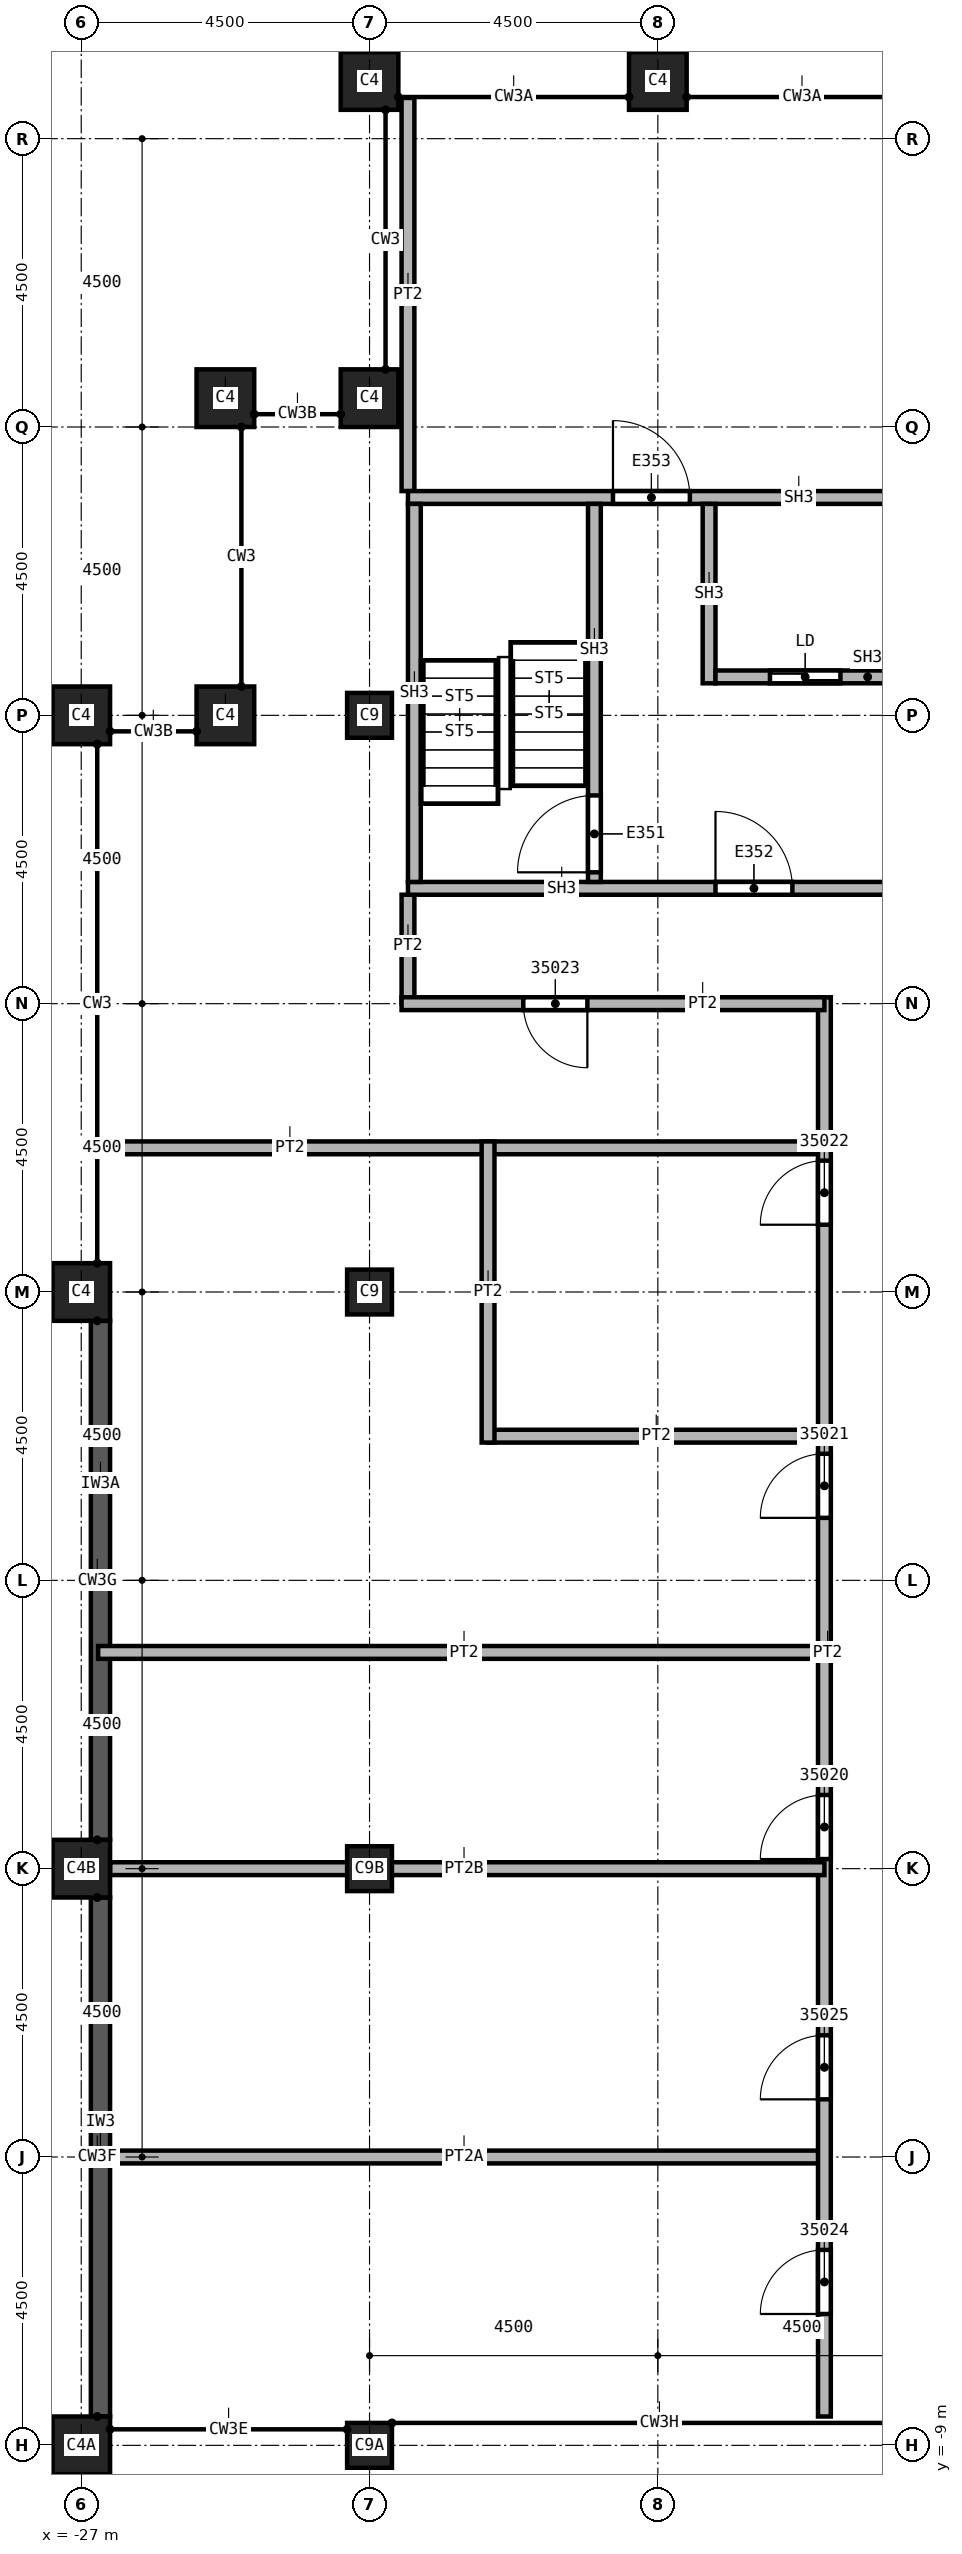
"""IFC4 building model, lengths in metres.
Left out: names, types, materials, properties, quantities, classifications, styles, units other than length and angle.
Written with IfcOpenShell. Run it as: python <this file> out.ifc"""

import sys

from ifc_helpers import new_model, si_unit, direction, frame, frame_2d, origin, origin_2d, place, context, subcontext, project, spatial, polyline, rectangle, outline, extrude, element, fill, save


model = new_model("IFC4")
c1 = context("Model", 3, precision=1e-05, world=origin(), true_north=direction((0.0, 1.0)))
c2 = subcontext(c1, "Body", "Model", "MODEL_VIEW")
j1 = project(units=[si_unit("LENGTHUNIT", "METRE"), si_unit("PLANEANGLEUNIT", "RADIAN")], contexts=[c1])
p1 = place(None, origin())
s1 = spatial("IfcSite", under=j1, at=p1, CompositionType="ELEMENT")
p2 = place(p1, origin())
s2 = spatial("IfcBuilding", under=s1, at=p2, CompositionType="ELEMENT")
p3 = place(p2, frame((0.0, 0.0, 376.0)))
s3 = spatial("IfcBuildingStorey", under=s2, at=p3, CompositionType="ELEMENT", Elevation=376.0)
p4 = place(p3, frame((-22.5, 0.0, 0.0), z_axis=(0.0, 0.0, 1.0), x_axis=(1.0, 0.0, 0.0)))
e1 = element("IfcColumn", 1, at=p4, inside=s3, PredefinedType="COLUMN", context=c2, shape_type="SweptSolid", body=[
    extrude(rectangle(XDim=0.7, YDim=0.7, at=origin_2d()), origin(), (0.0, 0.0, 1.0), 7.919),
])
for number, where, z_axis, x_axis in (
    (2, (-22.5, 9.0, 0.0), (0.0, 0.0, 1.0), (1.0, 0.0, 0.0)),
    (3, (-22.5, 18.0, 0.0), (0.0, 0.0, 1.0), (1.0, 0.0, 0.0)),
):
    element("IfcColumn", number, at=place(p3, frame(where, z_axis=z_axis, x_axis=x_axis)), inside=s3, PredefinedType="COLUMN", context=c2, shape_type="SweptSolid", body=[
        extrude(rectangle(XDim=0.7, YDim=0.7, at=origin_2d()), origin(), (0.0, 0.0, 1.0), 4.6),
    ])
p5 = place(p3, frame((-22.5, -9.0, 0.0), z_axis=(0.0, 0.0, 1.0), x_axis=(1.0, 0.0, 0.0)))
e4 = element("IfcColumn", 4, at=p5, inside=s3, PredefinedType="COLUMN", context=c2, shape_type="SweptSolid", body=[
    extrude(rectangle(XDim=0.7, YDim=0.7, at=origin_2d()), origin(), (0.0, 0.0, 1.0), 3.725),
])
for number, where, z_axis, x_axis in (
    (5, (-18.0, 27.9, 0.0), (0.0, 0.0, 1.0), (1.0, 0.0, 0.0)),
    (6, (-22.5, 27.9, 0.0), (0.0, 0.0, 1.0), (1.0, 0.0, 0.0)),
):
    element("IfcColumn", number, at=place(p3, frame(where, z_axis=z_axis, x_axis=x_axis)), inside=s3, PredefinedType="COLUMN", context=c2, shape_type="SweptSolid", body=[
        extrude(rectangle(XDim=0.9, YDim=0.9, at=origin_2d()), origin(), (0.0, 0.0, 1.0), 4.6),
    ])
p6 = place(p3, frame((-27.0, 0.0, 0.0), z_axis=(0.0, 0.0, 1.0), x_axis=(0.0, 1.0, 0.0)))
e7 = element("IfcColumn", 7, at=p6, inside=s3, PredefinedType="COLUMN", context=c2, shape_type="SweptSolid", body=[
    extrude(rectangle(XDim=0.9, YDim=0.9, at=origin_2d()), origin(), (0.0, 0.0, 1.0), 7.919),
])
for number, where, z_axis, x_axis in (
    (8, (-27.0, 9.0, 0.0), (0.0, 0.0, 1.0), (0.0, 1.0, 0.0)),
    (9, (-27.0, 18.0, 0.0), (0.0, 0.0, 1.0), (0.0, 1.0, 0.0)),
):
    element("IfcColumn", number, at=place(p3, frame(where, z_axis=z_axis, x_axis=x_axis)), inside=s3, PredefinedType="COLUMN", context=c2, shape_type="SweptSolid", body=[
        extrude(rectangle(XDim=0.9, YDim=0.9, at=origin_2d()), origin(), (0.0, 0.0, 1.0), 4.6),
    ])
p7 = place(p3, frame((-27.0, -9.0, 0.0), z_axis=(0.0, 0.0, 1.0), x_axis=(0.0, 1.0, 0.0)))
e10 = element("IfcColumn", 10, at=p7, inside=s3, PredefinedType="COLUMN", context=c2, shape_type="SweptSolid", body=[
    extrude(rectangle(XDim=0.9, YDim=0.9, at=origin_2d()), origin(), (0.0, 0.0, 1.0), 3.725),
])
for number, where, z_axis, x_axis in (
    (11, (-22.5, 22.95, 0.0), (0.0, 0.0, 1.0), (1.0, 0.0, 0.0)),
    (12, (-24.75, 22.95, 0.0), (0.0, 0.0, 1.0), (1.0, 0.0, 0.0)),
    (13, (-24.75, 18.0, 0.0), (0.0, 0.0, 1.0), (1.0, 0.0, 0.0)),
):
    element("IfcColumn", number, at=place(p3, frame(where, z_axis=z_axis, x_axis=x_axis)), inside=s3, PredefinedType="COLUMN", context=c2, shape_type="SweptSolid", body=[
        extrude(rectangle(XDim=0.9, YDim=0.9, at=origin_2d()), origin(), (0.0, 0.0, 1.0), 4.6),
    ])
p8 = place(p3, frame((-26.7, 8.55, 8.633), z_axis=(0.0, 0.0, 1.0), x_axis=(0.0, -1.0, 0.0)))
e14 = element("IfcWall", 14, at=p8, inside=s3, PredefinedType="SOLIDWALL", context=c2, shape_type="SweptSolid", body=[
    extrude(outline(polyline([(0.0, 0.0), (8.1, 0.0), (8.1, 0.05), (0.0, 3.728), (0.0, 0.0)])), frame((0.0, 0.15, 0.0), z_axis=(0.0, -1.0, 0.0), x_axis=(1.0, 0.0, 0.0)), (0.0, 0.0, 1.0), 0.3),
])
p9 = place(p3, frame((-26.7, -0.45, 4.439), z_axis=(0.0, 0.0, 1.0), x_axis=(0.0, -1.0, 0.0)))
e15 = element("IfcWall", 15, at=p9, inside=s3, PredefinedType="SOLIDWALL", context=c2, shape_type="SweptSolid", body=[
    extrude(outline(polyline([(0.0, 0.0), (8.1, 0.0), (8.1, 0.05), (0.0, 3.728), (0.0, 0.0)])), frame((0.0, 0.15, 0.0), z_axis=(0.0, -1.0, 0.0), x_axis=(1.0, 0.0, 0.0)), (0.0, 0.0, 1.0), 0.3),
])
for number, where, z_axis, x_axis in (
    (16, (-26.736, 3.375, 0.0), (0.0, 0.0, 1.0), (1.0, 0.0, 0.0)),
    (17, (-26.736, 11.25, 0.0), (0.0, 0.0, 1.0), (1.0, 0.0, 0.0)),
):
    element("IfcWall", number, at=place(p3, frame(where, z_axis=z_axis, x_axis=x_axis)), inside=s3, PredefinedType="PARTITIONING", context=c2, shape_type="SweptSolid", body=[
        extrude(rectangle(XDim=11.336, YDim=0.2, at=frame_2d((5.668, 0.0))), origin(), (0.0, 0.0, 1.0), 4.15),
    ])
p10 = place(p3, frame((-26.55, -4.5, 0.0), z_axis=(0.0, 0.0, 1.0), x_axis=(1.0, 0.0, 0.0)))
e18 = element("IfcWall", 18, at=p10, inside=s3, PredefinedType="PARTITIONING", context=c2, shape_type="SweptSolid", body=[
    extrude(rectangle(XDim=11.15, YDim=0.2, at=frame_2d((5.575, 0.0))), origin(), (0.0, 0.0, 1.0), 4.566),
])
p11 = place(p3, frame((-21.9, 13.5, 0.0), z_axis=(0.0, 0.0, 1.0), x_axis=(0.0, 1.0, 0.0)))
e19 = element("IfcWall", 19, at=p11, inside=s3, PredefinedType="PARTITIONING", context=c2, shape_type="SweptSolid", body=[
    extrude(rectangle(XDim=1.7, YDim=0.2, at=frame_2d((0.85, 0.0))), origin(), (0.0, 0.0, 1.0), 4.15),
])
p12 = place(p3, frame((-21.9, 21.5, 0.0), z_axis=(0.0, 0.0, 1.0), x_axis=(0.0, 1.0, 0.0)))
e20 = element("IfcWall", 20, at=p12, inside=s3, PredefinedType="PARTITIONING", context=c2, shape_type="SweptSolid", body=[
    extrude(rectangle(XDim=6.136, YDim=0.2, at=frame_2d((3.068, 0.0))), origin(), (0.0, 0.0, 1.0), 4.15),
])
p13 = place(p3, frame((-20.65, 6.75, 0.0), z_axis=(0.0, 0.0, 1.0), x_axis=(1.0, 0.0, 0.0)))
e21 = element("IfcWall", 21, at=p13, inside=s3, PredefinedType="PARTITIONING", context=c2, shape_type="SweptSolid", body=[
    extrude(rectangle(XDim=5.25, YDim=0.2, at=frame_2d((2.625, 0.0))), origin(), (0.0, 0.0, 1.0), 4.15),
])
p14 = place(p3, frame((-20.65, 11.35, 0.0), z_axis=(0.0, 0.0, 1.0), x_axis=(0.0, -1.0, 0.0)))
e22 = element("IfcWall", 22, at=p14, inside=s3, PredefinedType="PARTITIONING", context=c2, shape_type="SweptSolid", body=[
    extrude(rectangle(XDim=4.7, YDim=0.2, at=frame_2d((2.35, 0.0))), origin(), (0.0, 0.0, 1.0), 4.15),
])
p15 = place(p3, frame((-15.4, -8.55, 0.0), z_axis=(0.0, 0.0, 1.0), x_axis=(0.0, 1.0, 0.0)))
e23 = element("IfcWall", 23, at=p15, inside=s3, PredefinedType="PARTITIONING", context=c2, shape_type="SweptSolid", body=[
    extrude(rectangle(XDim=22.15, YDim=0.2, at=frame_2d((11.075, 0.0))), origin(), (0.0, 0.0, 1.0), 4.15),
])
p16 = place(p15, frame((8.7, 0.0, 0.0)))
e24 = element("IfcOpeningElement", 24, at=p16, cuts=e23, PredefinedType="OPENING", context=c2, shape_type="SweptSolid", body=[
    extrude(rectangle(XDim=1.0, YDim=2.1, at=frame_2d((0.5, 1.05))), frame((0.0, 0.1, 0.0), z_axis=(0.0, -1.0, 0.0), x_axis=(1.0, 0.0, 0.0)), (0.0, 0.0, 1.0), 0.2),
])
p17 = place(p15, frame((14.025, 0.0, 0.0)))
e25 = element("IfcOpeningElement", 25, at=p17, cuts=e23, PredefinedType="OPENING", context=c2, shape_type="SweptSolid", body=[
    extrude(rectangle(XDim=1.0, YDim=2.1, at=frame_2d((0.5, 1.05))), frame((0.0, 0.1, 0.0), z_axis=(0.0, -1.0, 0.0), x_axis=(1.0, 0.0, 0.0)), (0.0, 0.0, 1.0), 0.2),
])
p18 = place(p15, frame((18.6, 0.0, 0.0)))
e26 = element("IfcOpeningElement", 26, at=p18, cuts=e23, PredefinedType="OPENING", context=c2, shape_type="SweptSolid", body=[
    extrude(rectangle(XDim=1.0, YDim=2.1, at=frame_2d((0.5, 1.05))), frame((0.0, 0.1, 0.0), z_axis=(0.0, -1.0, 0.0), x_axis=(1.0, 0.0, 0.0)), (0.0, 0.0, 1.0), 0.2),
])
p19 = place(p15, frame((1.6, 0.0, 0.0)))
e27 = element("IfcOpeningElement", 27, at=p19, cuts=e23, PredefinedType="OPENING", context=c2, shape_type="SweptSolid", body=[
    extrude(rectangle(XDim=1.0, YDim=2.1, at=frame_2d((0.5, 1.05))), frame((0.0, 0.1, 0.0), z_axis=(0.0, -1.0, 0.0), x_axis=(1.0, 0.0, 0.0)), (0.0, 0.0, 1.0), 0.2),
])
p20 = place(p15, frame((4.95, 0.0, 0.0)))
e28 = element("IfcOpeningElement", 28, at=p20, cuts=e23, PredefinedType="OPENING", context=c2, shape_type="SweptSolid", body=[
    extrude(rectangle(XDim=1.0, YDim=2.1, at=frame_2d((0.5, 1.05))), frame((0.0, 0.1, 0.0), z_axis=(0.0, -1.0, 0.0), x_axis=(1.0, 0.0, 0.0)), (0.0, 0.0, 1.0), 0.2),
])
p21 = place(p3, frame((-15.4, 0.0, 0.0), z_axis=(0.0, 0.0, 1.0), x_axis=(-1.0, 0.0, 0.0)))
e29 = element("IfcWall", 29, at=p21, inside=s3, PredefinedType="PARTITIONING", context=c2, shape_type="SweptSolid", body=[
    extrude(rectangle(XDim=11.15, YDim=0.2, at=frame_2d((5.575, 0.0))), origin(), (0.0, 0.0, 1.0), 6.453),
])
p22 = place(p3, frame((-15.4, 13.5, 0.0), z_axis=(0.0, 0.0, 1.0), x_axis=(-1.0, 0.0, 0.0)))
e30 = element("IfcWall", 30, at=p22, inside=s3, PredefinedType="PARTITIONING", context=c2, shape_type="SweptSolid", body=[
    extrude(rectangle(XDim=6.6, YDim=0.2, at=frame_2d((3.3, 0.0))), origin(), (0.0, 0.0, 1.0), 4.15),
])
p23 = place(p22, frame((3.7, 0.0, 0.0)))
e31 = element("IfcOpeningElement", 31, at=p23, cuts=e30, PredefinedType="OPENING", context=c2, shape_type="SweptSolid", body=[
    extrude(rectangle(XDim=1.0, YDim=2.1, at=frame_2d((0.5, 1.05))), frame((0.0, 0.1, 0.0), z_axis=(0.0, -1.0, 0.0), x_axis=(1.0, 0.0, 0.0)), (0.0, 0.0, 1.0), 0.2),
])
p24 = place(p3, frame((-21.9, 15.3, 0.0), z_axis=(0.0, 0.0, 1.0), x_axis=(1.0, 0.0, 0.0)))
e32 = element("IfcWall", 32, at=p24, inside=s3, PredefinedType="SOLIDWALL", context=c2, shape_type="SweptSolid", body=[
    extrude(rectangle(XDim=8.275, YDim=0.2, at=frame_2d((4.137, 0.0))), origin(), (0.0, 0.0, 1.0), 4.15),
])
p25 = place(p24, frame((4.8, 0.0, 0.0)))
e33 = element("IfcOpeningElement", 33, at=p25, cuts=e32, PredefinedType="OPENING", context=c2, shape_type="SweptSolid", body=[
    extrude(rectangle(XDim=1.2, YDim=2.1, at=frame_2d((0.6, 1.05))), frame((0.0, 0.1, 0.0), z_axis=(0.0, -1.0, 0.0), x_axis=(1.0, 0.0, 0.0)), (0.0, 0.0, 1.0), 0.2),
])
p26 = place(p3, frame((-21.9, 21.4, 0.0), z_axis=(0.0, 0.0, 1.0), x_axis=(1.0, 0.0, 0.0)))
e34 = element("IfcWall", 34, at=p26, inside=s3, PredefinedType="SOLIDWALL", context=c2, shape_type="SweptSolid", body=[
    extrude(rectangle(XDim=7.8, YDim=0.2, at=frame_2d((3.9, 0.0))), origin(), (0.0, 0.0, 1.0), 4.15),
])
p27 = place(p26, frame((3.2, 0.0, 0.0)))
e35 = element("IfcOpeningElement", 35, at=p27, cuts=e34, PredefinedType="OPENING", context=c2, shape_type="SweptSolid", body=[
    extrude(rectangle(XDim=1.2, YDim=2.1, at=frame_2d((0.6, 1.05))), frame((0.0, 0.1, 0.0), z_axis=(0.0, -1.0, 0.0), x_axis=(1.0, 0.0, 0.0)), (0.0, 0.0, 1.0), 0.2),
])
p28 = place(p3, frame((-21.8, 15.4, 0.0), z_axis=(0.0, 0.0, 1.0), x_axis=(0.0, 1.0, 0.0)))
e36 = element("IfcWall", 36, at=p28, inside=s3, PredefinedType="SOLIDWALL", context=c2, shape_type="SweptSolid", body=[
    extrude(rectangle(XDim=5.9, YDim=0.2, at=frame_2d((2.95, 0.0))), origin(), (0.0, 0.0, 1.0), 4.15),
])
p29 = place(p3, frame((-18.99, 15.4, 0.0), z_axis=(0.0, 0.0, 1.0), x_axis=(0.0, 1.0, 0.0)))
e37 = element("IfcWall", 37, at=p29, inside=s3, PredefinedType="SOLIDWALL", context=c2, shape_type="SweptSolid", body=[
    extrude(rectangle(XDim=5.9, YDim=0.2, at=frame_2d((2.95, 0.0))), origin(), (0.0, 0.0, 1.0), 4.15),
])
p30 = place(p29, frame((0.15, 0.0, 0.0)))
e38 = element("IfcOpeningElement", 38, at=p30, cuts=e37, PredefinedType="OPENING", context=c2, shape_type="SweptSolid", body=[
    extrude(rectangle(XDim=1.2, YDim=2.1, at=frame_2d((0.6, 1.05))), frame((0.0, 0.1, 0.0), z_axis=(0.0, -1.0, 0.0), x_axis=(1.0, 0.0, 0.0)), (0.0, 0.0, 1.0), 0.2),
])
p31 = place(p3, frame((-17.2, 18.5, 0.0), z_axis=(0.0, 0.0, 1.0), x_axis=(0.0, 1.0, 0.0)))
e39 = element("IfcWall", 39, at=p31, inside=s3, PredefinedType="SOLIDWALL", context=c2, shape_type="SweptSolid", body=[
    extrude(rectangle(XDim=2.8, YDim=0.2, at=frame_2d((1.4, 0.0))), origin(), (0.0, 0.0, 1.0), 4.15),
])
p32 = place(p3, frame((-17.1, 18.6, 0.0), z_axis=(0.0, 0.0, 1.0), x_axis=(1.0, 0.0, 0.0)))
e40 = element("IfcWall", 40, at=p32, inside=s3, PredefinedType="SOLIDWALL", context=c2, shape_type="SweptSolid", body=[
    extrude(rectangle(XDim=2.8, YDim=0.2, at=frame_2d((1.4, 0.0))), origin(), (0.0, 0.0, 1.0), 4.15),
])
p33 = place(p32, frame((0.85, 0.0, 0.0)))
e41 = element("IfcOpeningElement", 41, at=p33, cuts=e40, PredefinedType="OPENING", context=c2, shape_type="SweptSolid", body=[
    extrude(rectangle(XDim=1.1, YDim=2.1, at=frame_2d((0.55, 1.05))), frame((0.0, 0.1, 0.0), z_axis=(0.0, -1.0, 0.0), x_axis=(1.0, 0.0, 0.0)), (0.0, 0.0, 1.0), 0.2),
])
p34 = place(p16, origin())
e42 = element("IfcDoor", 42, at=p34, inside=s3, OperationType="SINGLE_SWING_LEFT", PredefinedType="DOOR", context=c2, shape_type="SweptSolid", body=[
    extrude(rectangle(XDim=1.0, YDim=2.1, at=frame_2d((0.5, 1.05))), frame((0.0, 0.025, 0.0), z_axis=(0.0, -1.0, 0.0), x_axis=(1.0, 0.0, 0.0)), (0.0, 0.0, 1.0), 0.05),
])
fill(e24, e42)
p35 = place(p17, origin())
e43 = element("IfcDoor", 43, at=p35, inside=s3, OperationType="SINGLE_SWING_RIGHT", PredefinedType="DOOR", context=c2, shape_type="SweptSolid", body=[
    extrude(rectangle(XDim=1.0, YDim=2.1, at=frame_2d((0.5, 1.05))), frame((0.0, 0.025, 0.0), z_axis=(0.0, -1.0, 0.0), x_axis=(1.0, 0.0, 0.0)), (0.0, 0.0, 1.0), 0.05),
])
fill(e25, e43)
p36 = place(p18, origin())
e44 = element("IfcDoor", 44, at=p36, inside=s3, OperationType="SINGLE_SWING_LEFT", PredefinedType="DOOR", context=c2, shape_type="SweptSolid", body=[
    extrude(rectangle(XDim=1.0, YDim=2.1, at=frame_2d((0.5, 1.05))), frame((0.0, 0.025, 0.0), z_axis=(0.0, -1.0, 0.0), x_axis=(1.0, 0.0, 0.0)), (0.0, 0.0, 1.0), 0.05),
])
fill(e26, e44)
p37 = place(p23, origin())
e45 = element("IfcDoor", 45, at=p37, inside=s3, OperationType="SINGLE_SWING_RIGHT", PredefinedType="DOOR", context=c2, shape_type="SweptSolid", body=[
    extrude(rectangle(XDim=1.0, YDim=2.1, at=frame_2d((0.5, 1.05))), frame((0.0, 0.025, 0.0), z_axis=(0.0, -1.0, 0.0), x_axis=(1.0, 0.0, 0.0)), (0.0, 0.0, 1.0), 0.05),
])
fill(e31, e45)
p38 = place(p19, origin())
e46 = element("IfcDoor", 46, at=p38, inside=s3, OperationType="SINGLE_SWING_LEFT", PredefinedType="DOOR", context=c2, shape_type="SweptSolid", body=[
    extrude(rectangle(XDim=1.0, YDim=2.1, at=frame_2d((0.5, 1.05))), frame((0.0, 0.025, 0.0), z_axis=(0.0, -1.0, 0.0), x_axis=(1.0, 0.0, 0.0)), (0.0, 0.0, 1.0), 0.05),
])
fill(e27, e46)
p39 = place(p20, origin())
e47 = element("IfcDoor", 47, at=p39, inside=s3, OperationType="SINGLE_SWING_RIGHT", PredefinedType="DOOR", context=c2, shape_type="SweptSolid", body=[
    extrude(rectangle(XDim=1.0, YDim=2.1, at=frame_2d((0.5, 1.05))), frame((0.0, 0.025, 0.0), z_axis=(0.0, -1.0, 0.0), x_axis=(1.0, 0.0, 0.0)), (0.0, 0.0, 1.0), 0.05),
])
fill(e28, e47)
p40 = place(p30, origin())
e48 = element("IfcDoor", 48, at=p40, inside=s3, OperationType="SINGLE_SWING_LEFT", PredefinedType="DOOR", context=c2, shape_type="SweptSolid", body=[
    extrude(rectangle(XDim=1.2, YDim=2.1, at=frame_2d((0.6, 1.05))), frame((0.0, 0.025, 0.0), z_axis=(0.0, -1.0, 0.0), x_axis=(1.0, 0.0, 0.0)), (0.0, 0.0, 1.0), 0.05),
])
fill(e38, e48)
p41 = place(p33, origin())
e49 = element("IfcDoor", 49, at=p41, inside=s3, OperationType="SLIDING_TO_LEFT", PredefinedType="DOOR", context=c2, shape_type="SweptSolid", body=[
    extrude(rectangle(XDim=1.1, YDim=2.1, at=frame_2d((0.55, 1.05))), frame((0.0, 0.025, 0.0), z_axis=(0.0, -1.0, 0.0), x_axis=(1.0, 0.0, 0.0)), (0.0, 0.0, 1.0), 0.05),
])
fill(e41, e49)
p42 = place(p25, origin())
e50 = element("IfcDoor", 50, at=p42, inside=s3, OperationType="SINGLE_SWING_RIGHT", PredefinedType="DOOR", context=c2, shape_type="SweptSolid", body=[
    extrude(rectangle(XDim=1.2, YDim=2.1, at=frame_2d((0.6, 1.05))), frame((0.0, 0.025, 0.0), z_axis=(0.0, -1.0, 0.0), x_axis=(1.0, 0.0, 0.0)), (0.0, 0.0, 1.0), 0.05),
])
fill(e33, e50)
p43 = place(p27, origin())
e51 = element("IfcDoor", 51, at=p43, inside=s3, OperationType="SINGLE_SWING_LEFT", PredefinedType="DOOR", context=c2, shape_type="SweptSolid", body=[
    extrude(rectangle(XDim=1.2, YDim=2.1, at=frame_2d((0.6, 1.05))), frame((0.0, 0.025, 0.0), z_axis=(0.0, -1.0, 0.0), x_axis=(1.0, 0.0, 0.0)), (0.0, 0.0, 1.0), 0.05),
])
fill(e35, e51)
save(model, sys.argv[1])
